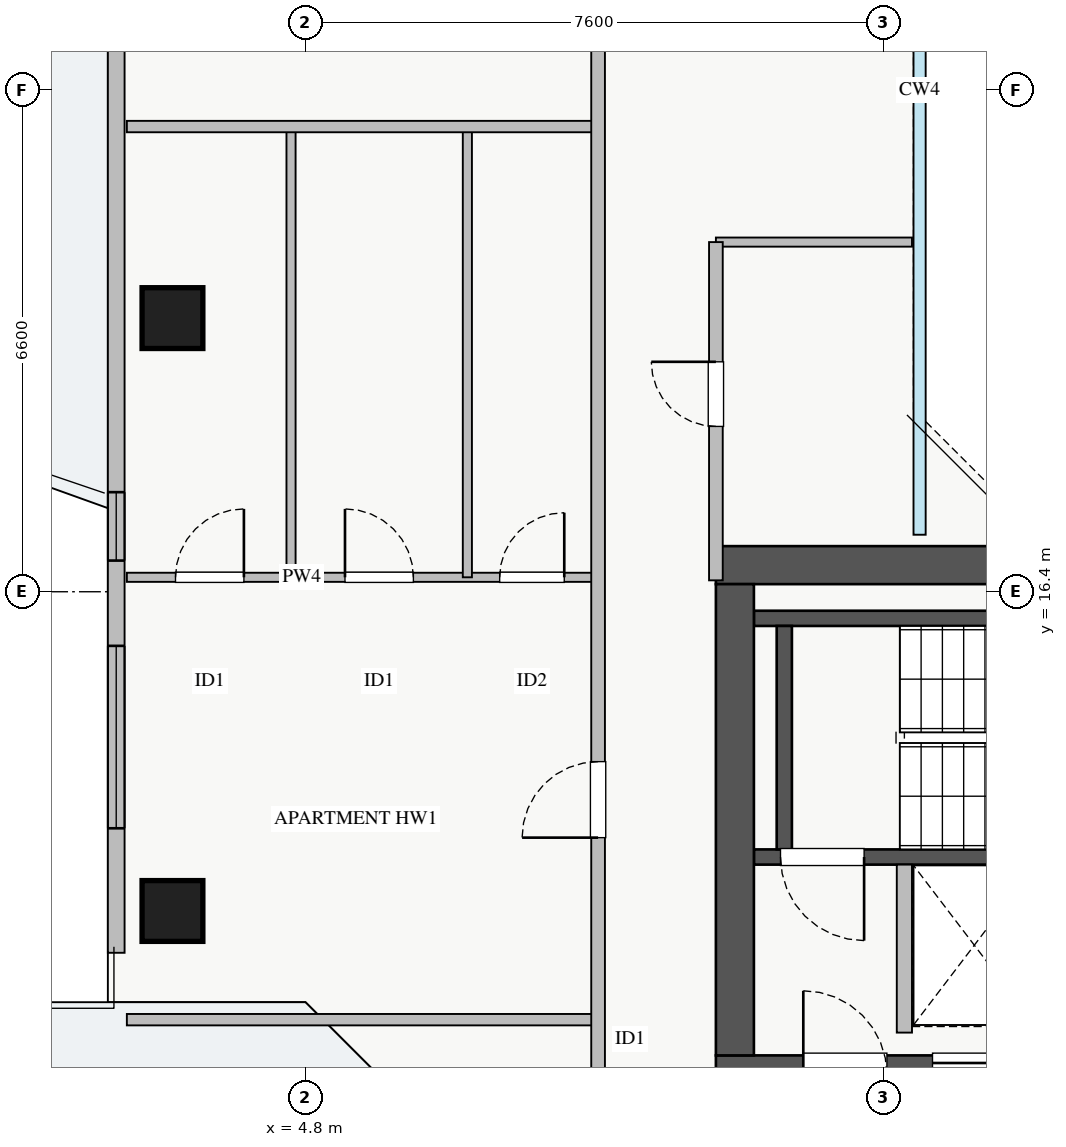
"""IFC4 building model, lengths in metres.
Left out: names, types, materials, properties, quantities, classifications, styles, units other than length and angle.
Written with IfcOpenShell. Run it as: python <this file> out.ifc"""

import sys

from ifc_helpers import new_model, si_unit, direction, frame, frame_2d, origin, origin_2d, place, context, subcontext, project, spatial, rectangle, extrude, source, transform, mapped, element, fill, save


model = new_model("IFC4")
c1 = context("Model", 3, precision=1e-05, world=origin(), true_north=direction((0.0, 1.0)))
c2 = subcontext(c1, "Body", "Model", "MODEL_VIEW")
j1 = project(units=[si_unit("LENGTHUNIT", "METRE"), si_unit("PLANEANGLEUNIT", "RADIAN")], contexts=[c1])
p1 = place(None, origin())
s1 = spatial("IfcSite", under=j1, at=p1, CompositionType="ELEMENT")
p2 = place(p1, origin())
s2 = spatial("IfcBuilding", under=s1, at=p2, CompositionType="ELEMENT")
p3 = place(p2, frame((0.0, 0.0, 193.75)))
s3 = spatial("IfcBuildingStorey", under=s2, at=p3, CompositionType="ELEMENT", Elevation=193.75)
p4 = place(p3, frame((12.68, 12.8, 0.0), z_axis=(0.0, 0.0, 1.0), x_axis=(1.0, 0.0, 0.0)))
e1 = element("IfcWall", 1, at=p4, inside=s3, PredefinedType="SHEAR", context=c2, shape_type="SweptSolid", body=[
    extrude(rectangle(XDim=1.94, YDim=0.18, at=frame_2d((0.97, 0.0))), origin(), (0.0, 0.0, 1.0), 3.07),
])
p5 = place(p3, frame((10.7, 12.91, 0.0), z_axis=(0.0, 0.0, 1.0), x_axis=(1.0, 0.0, 0.0)))
e2 = element("IfcWall", 2, at=p5, inside=s3, PredefinedType="SHEAR", context=c2, shape_type="SweptSolid", body=[
    extrude(rectangle(XDim=7.45, YDim=0.2, at=frame_2d((3.725, 0.0))), origin(), (0.0, 0.0, 1.0), 3.25),
])
p6 = place(p5, frame((0.35, 0.0, 0.0)))
e3 = element("IfcOpeningElement", 3, at=p6, cuts=e2, PredefinedType="OPENING", context=c2, shape_type="SweptSolid", body=[
    extrude(rectangle(XDim=1.1, YDim=2.05, at=frame_2d((0.55, 1.025))), frame((0.0, 0.11, 0.0), z_axis=(0.0, -1.0, 0.0), x_axis=(1.0, 0.0, 0.0)), (0.0, 0.0, 1.0), 0.22),
])
p7 = place(p3, frame((10.7, 16.05, 0.0), z_axis=(0.0, 0.0, 1.0), x_axis=(1.0, 0.0, 0.0)))
e4 = element("IfcWall", 4, at=p7, inside=s3, PredefinedType="SHEAR", context=c2, shape_type="SweptSolid", body=[
    extrude(rectangle(XDim=7.45, YDim=0.2, at=frame_2d((3.725, 0.0))), origin(), (0.0, 0.0, 1.0), 3.25),
])
p8 = place(p3, frame((11.1, 13.01, 0.0), z_axis=(0.0, 0.0, 1.0), x_axis=(0.0, 1.0, 0.0)))
e5 = element("IfcWall", 5, at=p8, inside=s3, PredefinedType="SHEAR", context=c2, shape_type="SweptSolid", body=[
    extrude(rectangle(XDim=2.94, YDim=0.2, at=frame_2d((1.47, 0.0))), origin(), (0.0, 0.0, 1.0), 3.25),
])
p9 = place(p3, frame((10.2, 10.05, 0.0), z_axis=(0.0, 0.0, 1.0), x_axis=(1.0, 0.0, 0.0)))
e6 = element("IfcWall", 6, at=p9, inside=s3, PredefinedType="SHEAR", context=c2, shape_type="SweptSolid", body=[
    extrude(rectangle(XDim=17.6, YDim=0.5, at=frame_2d((8.8, 0.0))), origin(), (0.0, 0.0, 1.0), 3.25),
])
p10 = place(p9, frame((1.15, 0.0, 0.0)))
e7 = element("IfcOpeningElement", 7, at=p10, cuts=e6, PredefinedType="OPENING", context=c2, shape_type="SweptSolid", body=[
    extrude(rectangle(XDim=1.1, YDim=2.05, at=frame_2d((0.55, 1.025))), frame((0.0, 0.26, 0.0), z_axis=(0.0, -1.0, 0.0), x_axis=(1.0, 0.0, 0.0)), (0.0, 0.0, 1.0), 0.52),
])
p11 = place(p9, frame((8.3, 0.0, 0.0)))
e8 = element("IfcOpeningElement", 8, at=p11, cuts=e6, PredefinedType="OPENING", context=c2, shape_type="SweptSolid", body=[
    extrude(rectangle(XDim=1.1, YDim=2.05, at=frame_2d((0.55, 1.025))), frame((0.0, 0.26, 0.0), z_axis=(0.0, -1.0, 0.0), x_axis=(1.0, 0.0, 0.0)), (0.0, 0.0, 1.0), 0.52),
])
p12 = place(p9, frame((2.85, 0.0, 0.0)))
e9 = element("IfcOpeningElement", 9, at=p12, cuts=e6, PredefinedType="OPENING", context=c2, shape_type="SweptSolid", body=[
    extrude(rectangle(XDim=1.1, YDim=2.05, at=frame_2d((0.55, 1.025))), frame((0.0, 0.26, 0.0), z_axis=(0.0, -1.0, 0.0), x_axis=(1.0, 0.0, 0.0)), (0.0, 0.0, 1.0), 0.52),
])
p13 = place(p9, frame((5.8, 0.0, 0.0)))
e10 = element("IfcOpeningElement", 10, at=p13, cuts=e6, PredefinedType="OPENING", context=c2, shape_type="SweptSolid", body=[
    extrude(rectangle(XDim=1.0, YDim=2.05, at=frame_2d((0.5, 1.025))), frame((0.0, 0.26, 0.0), z_axis=(0.0, -1.0, 0.0), x_axis=(1.0, 0.0, 0.0)), (0.0, 0.0, 1.0), 0.52),
])
p14 = place(p9, frame((14.74, 0.0, 0.0)))
e11 = element("IfcOpeningElement", 11, at=p14, cuts=e6, PredefinedType="OPENING", context=c2, shape_type="SweptSolid", body=[
    extrude(rectangle(XDim=1.0, YDim=2.05, at=frame_2d((0.5, 1.025))), frame((0.0, 0.26, 0.0), z_axis=(0.0, -1.0, 0.0), x_axis=(1.0, 0.0, 0.0)), (0.0, 0.0, 1.0), 0.52),
])
p15 = place(p9, frame((10.155, 0.0, 0.0)))
e12 = element("IfcOpeningElement", 12, at=p15, cuts=e6, PredefinedType="OPENING", context=c2, shape_type="SweptSolid", body=[
    extrude(rectangle(XDim=1.0, YDim=2.05, at=frame_2d((0.5, 1.025))), frame((0.0, 0.26, 0.0), z_axis=(0.0, -1.0, 0.0), x_axis=(1.0, 0.0, 0.0)), (0.0, 0.0, 1.0), 0.52),
])
p16 = place(p9, frame((11.87, 0.0, 0.0)))
e13 = element("IfcOpeningElement", 13, at=p16, cuts=e6, PredefinedType="OPENING", context=c2, shape_type="SweptSolid", body=[
    extrude(rectangle(XDim=1.0, YDim=2.05, at=frame_2d((0.5, 1.025))), frame((0.0, 0.26, 0.0), z_axis=(0.0, -1.0, 0.0), x_axis=(1.0, 0.0, 0.0)), (0.0, 0.0, 1.0), 0.52),
])
p17 = place(p9, frame((13.46, 0.0, 0.0)))
e14 = element("IfcOpeningElement", 14, at=p17, cuts=e6, PredefinedType="OPENING", context=c2, shape_type="SweptSolid", body=[
    extrude(rectangle(XDim=1.0, YDim=2.05, at=frame_2d((0.5, 1.025))), frame((0.0, 0.26, 0.0), z_axis=(0.0, -1.0, 0.0), x_axis=(1.0, 0.0, 0.0)), (0.0, 0.0, 1.0), 0.52),
])
p18 = place(p3, frame((10.2, 16.75, 0.0), z_axis=(0.0, 0.0, 1.0), x_axis=(1.0, 0.0, 0.0)))
e15 = element("IfcWall", 15, at=p18, inside=s3, PredefinedType="SHEAR", context=c2, shape_type="SweptSolid", body=[
    extrude(rectangle(XDim=17.6, YDim=0.5, at=frame_2d((8.8, 0.0))), origin(), (0.0, 0.0, 1.0), 3.25),
])
p19 = place(p3, frame((10.45, 10.3, 0.0), z_axis=(0.0, 0.0, 1.0), x_axis=(0.0, 1.0, 0.0)))
e16 = element("IfcWall", 16, at=p19, inside=s3, PredefinedType="SHEAR", context=c2, shape_type="SweptSolid", body=[
    extrude(rectangle(XDim=6.2, YDim=0.5, at=frame_2d((3.1, 0.0))), origin(), (0.0, 0.0, 1.0), 3.25),
])
m1 = source(origin(), c2, "Body", "SweptSolid", [
    extrude(rectangle(XDim=0.8, YDim=0.8, at=origin_2d()), origin(), (0.0, 0.0, 1.0), 3.25),
])
for number, where, z_axis, x_axis in (
    (17, (3.05, 20.0, 0.0), (0.0, 0.0, 1.0), (1.0, 0.0, 0.0)),
    (18, (3.05, 12.2, 0.0), (0.0, 0.0, 1.0), (1.0, 0.0, 0.0)),
):
    element("IfcColumn", number, at=place(p3, frame(where, z_axis=z_axis, x_axis=x_axis)), inside=s3, PredefinedType="COLUMN", context=c2, shape_type="MappedRepresentation", body=[
        mapped(m1, transform((0.0, 0.0, 0.0), x_axis=(1.0, 0.0, 0.0), y_axis=(0.0, 1.0, 0.0), z_axis=(0.0, 0.0, 1.0), scale=1.0)),
    ])
p20 = place(p3, frame((2.31, 11.65, 0.0), z_axis=(0.0, 0.0, 1.0), x_axis=(0.0, 1.0, 0.0)))
e19 = element("IfcWall", 19, at=p20, inside=s3, PredefinedType="STANDARD", context=c2, shape_type="SweptSolid", body=[
    extrude(rectangle(XDim=22.7, YDim=0.22, at=frame_2d((11.35, 0.0))), origin(), (0.0, 0.0, 1.0), 2.61),
])
p21 = place(p20, frame((12.2, 0.0, 0.0)))
e20 = element("IfcOpeningElement", 20, at=p21, cuts=e19, PredefinedType="OPENING", context=c2, shape_type="SweptSolid", body=[
    extrude(rectangle(XDim=1.2, YDim=2.1, at=frame_2d((0.6, 1.05))), frame((0.0, 0.12, 0.0), z_axis=(0.0, -1.0, 0.0), x_axis=(1.0, 0.0, 0.0)), (0.0, 0.0, 1.0), 0.24),
])
p22 = place(p20, frame((1.638, 0.0, 0.9)))
e21 = element("IfcOpeningElement", 21, at=p22, cuts=e19, PredefinedType="OPENING", context=c2, shape_type="SweptSolid", body=[
    extrude(rectangle(XDim=2.4, YDim=1.48, at=frame_2d((1.2, 0.74))), frame((0.0, 0.12, 0.0), z_axis=(0.0, -1.0, 0.0), x_axis=(1.0, 0.0, 0.0)), (0.0, 0.0, 1.0), 0.24),
])
p23 = place(p20, frame((18.813, 0.0, 0.9)))
e22 = element("IfcOpeningElement", 22, at=p23, cuts=e19, PredefinedType="OPENING", context=c2, shape_type="SweptSolid", body=[
    extrude(rectangle(XDim=2.1, YDim=1.48, at=frame_2d((1.05, 0.74))), frame((0.0, 0.12, 0.0), z_axis=(0.0, -1.0, 0.0), x_axis=(1.0, 0.0, 0.0)), (0.0, 0.0, 1.0), 0.24),
])
p24 = place(p20, frame((5.16, 0.0, 0.9)))
e23 = element("IfcOpeningElement", 23, at=p24, cuts=e19, PredefinedType="OPENING", context=c2, shape_type="SweptSolid", body=[
    extrude(rectangle(XDim=0.9, YDim=1.2, at=frame_2d((0.45, 0.6))), frame((0.0, 0.12, 0.0), z_axis=(0.0, -1.0, 0.0), x_axis=(1.0, 0.0, 0.0)), (0.0, 0.0, 1.0), 0.24),
])
p25 = place(p20, frame((13.62, 0.0, 0.9)))
e24 = element("IfcOpeningElement", 24, at=p25, cuts=e19, PredefinedType="OPENING", context=c2, shape_type="SweptSolid", body=[
    extrude(rectangle(XDim=0.9, YDim=1.2, at=frame_2d((0.45, 0.6))), frame((0.0, 0.12, 0.0), z_axis=(0.0, -1.0, 0.0), x_axis=(1.0, 0.0, 0.0)), (0.0, 0.0, 1.0), 0.24),
])
p26 = place(p3, frame((12.68, 10.6, 0.0), z_axis=(0.0, 0.0, 1.0), x_axis=(0.0, 1.0, 0.0)))
e25 = element("IfcWall", 25, at=p26, inside=s3, PredefinedType="PARTITIONING", context=c2, shape_type="SweptSolid", body=[
    extrude(rectangle(XDim=2.21, YDim=0.2, at=frame_2d((1.105, 0.0))), origin(), (0.0, 0.0, 1.0), 3.07),
])
p27 = place(p3, frame((2.45, 10.77, 0.0), z_axis=(0.0, 0.0, 1.0), x_axis=(1.0, 0.0, 0.0)))
e26 = element("IfcWall", 26, at=p27, inside=s3, PredefinedType="PARTITIONING", context=c2, shape_type="SweptSolid", body=[
    extrude(rectangle(XDim=6.2, YDim=0.15, at=frame_2d((3.1, 0.0))), origin(), (0.0, 0.0, 1.0), 3.07),
])
p28 = place(p3, frame((2.45, 16.59, 0.0), z_axis=(0.0, 0.0, 1.0), x_axis=(1.0, 0.0, 0.0)))
e27 = element("IfcWall", 27, at=p28, inside=s3, PredefinedType="PLUMBINGWALL", context=c2, shape_type="SweptSolid", body=[
    extrude(rectangle(XDim=6.2, YDim=0.12, at=frame_2d((3.1, 0.0))), origin(), (0.0, 0.0, 1.0), 3.07),
])
p29 = place(p28, frame((0.64, 0.0, 0.0)))
e28 = element("IfcOpeningElement", 28, at=p29, cuts=e27, PredefinedType="OPENING", context=c2, shape_type="SweptSolid", body=[
    extrude(rectangle(XDim=0.9, YDim=2.05, at=frame_2d((0.45, 1.025))), frame((0.0, 0.07, 0.0), z_axis=(0.0, -1.0, 0.0), x_axis=(1.0, 0.0, 0.0)), (0.0, 0.0, 1.0), 0.14),
])
p30 = place(p28, frame((2.87, 0.0, 0.0)))
e29 = element("IfcOpeningElement", 29, at=p30, cuts=e27, PredefinedType="OPENING", context=c2, shape_type="SweptSolid", body=[
    extrude(rectangle(XDim=0.9, YDim=2.05, at=frame_2d((0.45, 1.025))), frame((0.0, 0.07, 0.0), z_axis=(0.0, -1.0, 0.0), x_axis=(1.0, 0.0, 0.0)), (0.0, 0.0, 1.0), 0.14),
])
p31 = place(p28, frame((4.905, 0.0, 0.0)))
e30 = element("IfcOpeningElement", 30, at=p31, cuts=e27, PredefinedType="OPENING", context=c2, shape_type="SweptSolid", body=[
    extrude(rectangle(XDim=0.85, YDim=2.05, at=frame_2d((0.425, 1.025))), frame((0.0, 0.07, 0.0), z_axis=(0.0, -1.0, 0.0), x_axis=(1.0, 0.0, 0.0)), (0.0, 0.0, 1.0), 0.14),
])
for number, where, z_axis, x_axis in (
    (31, (4.61, 16.59, 0.0), (0.0, 0.0, 1.0), (0.0, 1.0, 0.0)),
    (32, (6.93, 16.59, 0.0), (0.0, 0.0, 1.0), (0.0, 1.0, 0.0)),
):
    element("IfcWall", number, at=place(p3, frame(where, z_axis=z_axis, x_axis=x_axis)), inside=s3, PredefinedType="PLUMBINGWALL", context=c2, shape_type="SweptSolid", body=[
        extrude(rectangle(XDim=5.93, YDim=0.12, at=frame_2d((2.965, 0.0))), origin(), (0.0, 0.0, 1.0), 3.07),
    ])
p32 = place(p3, frame((2.45, 22.52, 0.0), z_axis=(0.0, 0.0, 1.0), x_axis=(1.0, 0.0, 0.0)))
e33 = element("IfcWall", 33, at=p32, inside=s3, PredefinedType="PARTITIONING", context=c2, shape_type="SweptSolid", body=[
    extrude(rectangle(XDim=6.2, YDim=0.15, at=frame_2d((3.1, 0.0))), origin(), (0.0, 0.0, 1.0), 3.07),
])
p33 = place(p3, frame((8.65, 6.2, 0.0), z_axis=(0.0, 0.0, 1.0), x_axis=(0.0, 1.0, 0.0)))
e34 = element("IfcWall", 34, at=p33, inside=s3, PredefinedType="PARTITIONING", context=c2, shape_type="SweptSolid", body=[
    extrude(rectangle(XDim=33.6, YDim=0.18, at=frame_2d((16.8, 0.0))), origin(), (0.0, 0.0, 1.0), 3.07),
])
p34 = place(p33, frame((29.605, 0.0, 0.0)))
e35 = element("IfcOpeningElement", 35, at=p34, cuts=e34, PredefinedType="OPENING", context=c2, shape_type="SweptSolid", body=[
    extrude(rectangle(XDim=0.9, YDim=2.05, at=frame_2d((0.45, 1.025))), frame((0.0, 0.1, 0.0), z_axis=(0.0, -1.0, 0.0), x_axis=(1.0, 0.0, 0.0)), (0.0, 0.0, 1.0), 0.2),
])
p35 = place(p33, frame((2.92, 0.0, 0.0)))
e36 = element("IfcOpeningElement", 36, at=p35, cuts=e34, PredefinedType="OPENING", context=c2, shape_type="SweptSolid", body=[
    extrude(rectangle(XDim=0.9, YDim=2.05, at=frame_2d((0.45, 1.025))), frame((0.0, 0.1, 0.0), z_axis=(0.0, -1.0, 0.0), x_axis=(1.0, 0.0, 0.0)), (0.0, 0.0, 1.0), 0.2),
])
p36 = place(p33, frame((6.965, 0.0, 0.0)))
e37 = element("IfcOpeningElement", 37, at=p36, cuts=e34, PredefinedType="OPENING", context=c2, shape_type="SweptSolid", body=[
    extrude(rectangle(XDim=1.0, YDim=2.05, at=frame_2d((0.5, 1.025))), frame((0.0, 0.1, 0.0), z_axis=(0.0, -1.0, 0.0), x_axis=(1.0, 0.0, 0.0)), (0.0, 0.0, 1.0), 0.2),
])
p37 = place(p33, frame((18.595, 0.0, 0.0)))
e38 = element("IfcOpeningElement", 38, at=p37, cuts=e34, PredefinedType="OPENING", context=c2, shape_type="SweptSolid", body=[
    extrude(rectangle(XDim=1.0, YDim=2.05, at=frame_2d((0.5, 1.025))), frame((0.0, 0.1, 0.0), z_axis=(0.0, -1.0, 0.0), x_axis=(1.0, 0.0, 0.0)), (0.0, 0.0, 1.0), 0.2),
])
p38 = place(p3, frame((10.2, 21.0, 0.0), z_axis=(0.0, 0.0, 1.0), x_axis=(1.0, 0.0, 0.0)))
e39 = element("IfcWall", 39, at=p38, inside=s3, PredefinedType="PLUMBINGWALL", context=c2, shape_type="SweptSolid", body=[
    extrude(rectangle(XDim=2.58, YDim=0.12, at=frame_2d((1.29, 0.0))), origin(), (0.0, 0.0, 1.0), 3.07),
])
p39 = place(p3, frame((10.2, 16.55, 0.0), z_axis=(0.0, 0.0, 1.0), x_axis=(0.0, 1.0, 0.0)))
e40 = element("IfcWall", 40, at=p39, inside=s3, PredefinedType="PARTITIONING", context=c2, shape_type="SweptSolid", body=[
    extrude(rectangle(XDim=4.45, YDim=0.18, at=frame_2d((2.225, 0.0))), origin(), (0.0, 0.0, 1.0), 3.07),
])
p40 = place(p39, frame((2.025, 0.0, 0.0)))
e41 = element("IfcOpeningElement", 41, at=p40, cuts=e40, PredefinedType="OPENING", context=c2, shape_type="SweptSolid", body=[
    extrude(rectangle(XDim=0.85, YDim=2.05, at=frame_2d((0.425, 1.025))), frame((0.0, 0.1, 0.0), z_axis=(0.0, -1.0, 0.0), x_axis=(1.0, 0.0, 0.0)), (0.0, 0.0, 1.0), 0.2),
])
m2 = source(origin(), c2, "Body", "SweptSolid", [
    extrude(rectangle(XDim=2.4, YDim=1.48, at=frame_2d((1.2, 0.74))), frame((0.0, 0.03, 0.0), z_axis=(0.0, -1.0, 0.0), x_axis=(1.0, 0.0, 0.0)), (0.0, 0.0, 1.0), 0.06),
])
p41 = place(p22, origin())
e42 = element("IfcWindow", 42, at=p41, inside=s3, PartitioningType="TRIPLE_PANEL_VERTICAL", PredefinedType="WINDOW", context=c2, shape_type="MappedRepresentation", body=[
    mapped(m2, transform((0.0, 0.0, 0.0), x_axis=(1.0, 0.0, 0.0), y_axis=(0.0, 1.0, 0.0), z_axis=(0.0, 0.0, 1.0), scale=1.0)),
])
fill(e21, e42)
m3 = source(origin(), c2, "Body", "SweptSolid", [
    extrude(rectangle(XDim=1.1, YDim=2.05, at=frame_2d((0.55, 1.025))), frame((0.0, 0.025, 0.0), z_axis=(0.0, -1.0, 0.0), x_axis=(1.0, 0.0, 0.0)), (0.0, 0.0, 1.0), 0.05),
])
p42 = place(p6, frame((1.1, 0.0, 0.0), z_axis=(0.0, 0.0, 1.0), x_axis=(-1.0, 0.0, 0.0)))
e43 = element("IfcDoor", 43, at=p42, inside=s3, OperationType="SINGLE_SWING_RIGHT", PredefinedType="DOOR", context=c2, shape_type="MappedRepresentation", body=[
    mapped(m3, transform((0.0, 0.0, 0.0), x_axis=(1.0, 0.0, 0.0), y_axis=(0.0, 1.0, 0.0), z_axis=(0.0, 0.0, 1.0), scale=1.0)),
])
fill(e3, e43)
m4 = source(origin(), c2, "Body", "SweptSolid", [
    extrude(rectangle(XDim=0.9, YDim=2.05, at=frame_2d((0.45, 1.025))), frame((0.0, 0.025, 0.0), z_axis=(0.0, -1.0, 0.0), x_axis=(1.0, 0.0, 0.0)), (0.0, 0.0, 1.0), 0.05),
])
p43 = place(p29, origin())
e44 = element("IfcDoor", 44, at=p43, inside=s3, OperationType="SINGLE_SWING_RIGHT", PredefinedType="DOOR", context=c2, shape_type="MappedRepresentation", body=[
    mapped(m4, transform((0.0, 0.0, 0.0), x_axis=(1.0, 0.0, 0.0), y_axis=(0.0, 1.0, 0.0), z_axis=(0.0, 0.0, 1.0), scale=1.0)),
])
fill(e28, e44)
p44 = place(p30, origin())
e45 = element("IfcDoor", 45, at=p44, inside=s3, OperationType="SINGLE_SWING_LEFT", PredefinedType="DOOR", context=c2, shape_type="MappedRepresentation", body=[
    mapped(m4, transform((0.0, 0.0, 0.0), x_axis=(1.0, 0.0, 0.0), y_axis=(0.0, 1.0, 0.0), z_axis=(0.0, 0.0, 1.0), scale=1.0)),
])
fill(e29, e45)
m5 = source(origin(), c2, "Body", "SweptSolid", [
    extrude(rectangle(XDim=0.85, YDim=2.05, at=frame_2d((0.425, 1.025))), frame((0.0, 0.025, 0.0), z_axis=(0.0, -1.0, 0.0), x_axis=(1.0, 0.0, 0.0)), (0.0, 0.0, 1.0), 0.05),
])
p45 = place(p31, origin())
e46 = element("IfcDoor", 46, at=p45, inside=s3, OperationType="SINGLE_SWING_RIGHT", PredefinedType="DOOR", context=c2, shape_type="MappedRepresentation", body=[
    mapped(m5, transform((0.0, 0.0, 0.0), x_axis=(1.0, 0.0, 0.0), y_axis=(0.0, 1.0, 0.0), z_axis=(0.0, 0.0, 1.0), scale=1.0)),
])
fill(e30, e46)
m6 = source(origin(), c2, "Body", "SweptSolid", [
    extrude(rectangle(XDim=1.0, YDim=2.05, at=frame_2d((0.5, 1.025))), frame((0.0, 0.025, 0.0), z_axis=(0.0, -1.0, 0.0), x_axis=(1.0, 0.0, 0.0)), (0.0, 0.0, 1.0), 0.05),
])
p46 = place(p36, origin())
e47 = element("IfcDoor", 47, at=p46, inside=s3, OperationType="SINGLE_SWING_LEFT", PredefinedType="DOOR", context=c2, shape_type="MappedRepresentation", body=[
    mapped(m6, transform((0.0, 0.0, 0.0), x_axis=(1.0, 0.0, 0.0), y_axis=(0.0, 1.0, 0.0), z_axis=(0.0, 0.0, 1.0), scale=1.0)),
])
fill(e37, e47)
p47 = place(p40, origin())
e48 = element("IfcDoor", 48, at=p47, inside=s3, OperationType="SINGLE_SWING_RIGHT", PredefinedType="DOOR", context=c2, shape_type="MappedRepresentation", body=[
    mapped(m5, transform((0.0, 0.0, 0.0), x_axis=(1.0, 0.0, 0.0), y_axis=(0.0, 1.0, 0.0), z_axis=(0.0, 0.0, 1.0), scale=1.0)),
])
fill(e41, e48)
m7 = source(origin(), c2, "Body", "SweptSolid", [
    extrude(rectangle(XDim=0.9, YDim=1.2, at=frame_2d((0.45, 0.6))), frame((0.0, 0.03, 0.0), z_axis=(0.0, -1.0, 0.0), x_axis=(1.0, 0.0, 0.0)), (0.0, 0.0, 1.0), 0.06),
])
p48 = place(p24, origin())
e49 = element("IfcWindow", 49, at=p48, inside=s3, PartitioningType="SINGLE_PANEL", PredefinedType="WINDOW", context=c2, shape_type="MappedRepresentation", body=[
    mapped(m7, transform((0.0, 0.0, 0.0), x_axis=(1.0, 0.0, 0.0), y_axis=(0.0, 1.0, 0.0), z_axis=(0.0, 0.0, 1.0), scale=1.0)),
])
fill(e23, e49)
save(model, sys.argv[1])
